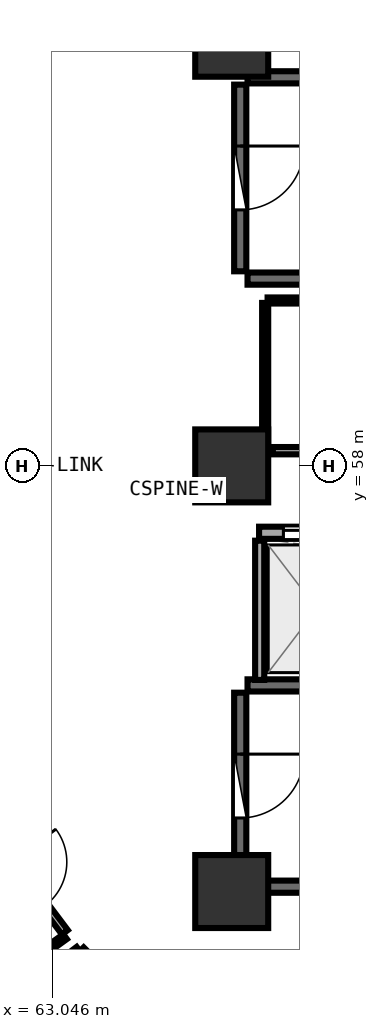
"""IFC4 building model, lengths in metres.
Left out: names, types, materials, properties, quantities, classifications, styles, units other than length and angle.
Written with IfcOpenShell. Run it as: python <this file> out.ifc"""

import sys

from ifc_helpers import new_model, si_unit, direction, frame, frame_2d, origin, origin_2d, place, context, subcontext, project, spatial, rectangle, extrude, element, fill, save


model = new_model("IFC4")
c1 = context("Model", 3, precision=1e-05, world=origin(), true_north=direction((0.0, 1.0)))
c2 = subcontext(c1, "Body", "Model", "MODEL_VIEW")
j1 = project(units=[si_unit("LENGTHUNIT", "METRE"), si_unit("PLANEANGLEUNIT", "RADIAN")], contexts=[c1])
p1 = place(None, origin())
s1 = spatial("IfcSite", under=j1, at=p1, CompositionType="ELEMENT")
p2 = place(p1, origin())
s2 = spatial("IfcBuilding", under=s1, at=p2, CompositionType="ELEMENT")
p3 = place(p2, frame((0.0, 0.0, 208.2)))
s3 = spatial("IfcBuildingStorey", under=s2, at=p3, CompositionType="ELEMENT", Elevation=208.2)
for number, where, z_axis, x_axis in (
    (1, (66.0, 51.0, 0.0), (0.0, 0.0, 1.0), (1.0, 0.0, 0.0)),
    (2, (66.0, 65.0, 0.0), (0.0, 0.0, 1.0), (1.0, 0.0, 0.0)),
    (3, (66.0, 58.0, 0.0), (0.0, 0.0, 1.0), (1.0, 0.0, 0.0)),
):
    element("IfcColumn", number, at=place(p3, frame(where, z_axis=z_axis, x_axis=x_axis)), inside=s3, PredefinedType="PILASTER", context=c2, shape_type="SweptSolid", body=[
        extrude(rectangle(XDim=1.2, YDim=1.2, at=origin_2d()), origin(), (0.0, 0.0, 1.0), 3.75),
    ])
for number, where, z_axis, x_axis in (
    (4, (66.26, 61.08, 0.0), (0.0, 0.0, 1.0), (1.0, 0.0, 0.0)),
    (5, (73.42, 64.39, 0.0), (0.0, 0.0, 1.0), (-1.0, 0.0, 0.0)),
):
    element("IfcWall", number, at=place(p3, frame(where, z_axis=z_axis, x_axis=x_axis)), inside=s3, PredefinedType="SHEAR", context=c2, shape_type="SweptSolid", body=[
        extrude(rectangle(XDim=7.16, YDim=0.2, at=frame_2d((3.58, 0.0))), origin(), (0.0, 0.0, 1.0), 3.49),
    ])
p4 = place(p3, frame((66.14, 64.27, 0.0), z_axis=(0.0, 0.0, 1.0), x_axis=(0.0, -1.0, 0.0)))
e6 = element("IfcWall", 6, at=p4, inside=s3, PredefinedType="SHEAR", context=c2, shape_type="SweptSolid", body=[
    extrude(rectangle(XDim=3.07, YDim=0.2, at=frame_2d((1.535, 0.0))), origin(), (0.0, 0.0, 1.0), 3.49),
])
p5 = place(p4, frame((1.01, 0.0, 0.0)))
e7 = element("IfcOpeningElement", 7, at=p5, cuts=e6, PredefinedType="OPENING", context=c2, shape_type="SweptSolid", body=[
    extrude(rectangle(XDim=1.05, YDim=2.1, at=frame_2d((0.525, 1.05))), frame((0.0, 0.11, 0.0), z_axis=(0.0, -1.0, 0.0), x_axis=(1.0, 0.0, 0.0)), (0.0, 0.0, 1.0), 0.22),
])
for number, where, z_axis, x_axis in (
    (8, (66.26, 51.08, 0.0), (0.0, 0.0, 1.0), (1.0, 0.0, 0.0)),
    (9, (73.42, 54.39, 0.0), (0.0, 0.0, 1.0), (-1.0, 0.0, 0.0)),
):
    element("IfcWall", number, at=place(p3, frame(where, z_axis=z_axis, x_axis=x_axis)), inside=s3, PredefinedType="SHEAR", context=c2, shape_type="SweptSolid", body=[
        extrude(rectangle(XDim=7.16, YDim=0.2, at=frame_2d((3.58, 0.0))), origin(), (0.0, 0.0, 1.0), 3.49),
    ])
p6 = place(p3, frame((66.14, 54.27, 0.0), z_axis=(0.0, 0.0, 1.0), x_axis=(0.0, -1.0, 0.0)))
e10 = element("IfcWall", 10, at=p6, inside=s3, PredefinedType="SHEAR", context=c2, shape_type="SweptSolid", body=[
    extrude(rectangle(XDim=3.07, YDim=0.2, at=frame_2d((1.535, 0.0))), origin(), (0.0, 0.0, 1.0), 3.49),
])
p7 = place(p6, frame((1.01, 0.0, 0.0)))
e11 = element("IfcOpeningElement", 11, at=p7, cuts=e10, PredefinedType="OPENING", context=c2, shape_type="SweptSolid", body=[
    extrude(rectangle(XDim=1.05, YDim=2.1, at=frame_2d((0.525, 1.05))), frame((0.0, 0.11, 0.0), z_axis=(0.0, -1.0, 0.0), x_axis=(1.0, 0.0, 0.0)), (0.0, 0.0, 1.0), 0.22),
])
p8 = place(p3, frame((66.45, 56.9, 0.0), z_axis=(0.0, 0.0, 1.0), x_axis=(1.0, 0.0, 0.0)))
e12 = element("IfcWall", 12, at=p8, inside=s3, PredefinedType="SOLIDWALL", context=c2, shape_type="SweptSolid", body=[
    extrude(rectangle(XDim=14.4, YDim=0.2, at=frame_2d((7.2, 0.0))), origin(), (0.0, 0.0, 1.0), 3.48),
])
p9 = place(p8, frame((0.4, 0.0, 0.0)))
e13 = element("IfcOpeningElement", 13, at=p9, cuts=e12, PredefinedType="OPENING", context=c2, shape_type="SweptSolid", body=[
    extrude(rectangle(XDim=1.1, YDim=2.1, at=frame_2d((0.55, 1.05))), frame((0.0, 0.11, 0.0), z_axis=(0.0, -1.0, 0.0), x_axis=(1.0, 0.0, 0.0)), (0.0, 0.0, 1.0), 0.22),
])
p10 = place(p8, frame((2.4, 0.0, 0.0)))
e14 = element("IfcOpeningElement", 14, at=p10, cuts=e12, PredefinedType="OPENING", context=c2, shape_type="SweptSolid", body=[
    extrude(rectangle(XDim=1.1, YDim=2.1, at=frame_2d((0.55, 1.05))), frame((0.0, 0.11, 0.0), z_axis=(0.0, -1.0, 0.0), x_axis=(1.0, 0.0, 0.0)), (0.0, 0.0, 1.0), 0.22),
])
p11 = place(p8, frame((4.4, 0.0, 0.0)))
e15 = element("IfcOpeningElement", 15, at=p11, cuts=e12, PredefinedType="OPENING", context=c2, shape_type="SweptSolid", body=[
    extrude(rectangle(XDim=1.1, YDim=2.1, at=frame_2d((0.55, 1.05))), frame((0.0, 0.11, 0.0), z_axis=(0.0, -1.0, 0.0), x_axis=(1.0, 0.0, 0.0)), (0.0, 0.0, 1.0), 0.22),
])
p12 = place(p3, frame((66.46, 54.48, 0.0), z_axis=(0.0, 0.0, 1.0), x_axis=(0.0, 1.0, 0.0)))
e16 = element("IfcWall", 16, at=p12, inside=s3, PredefinedType="PARTITIONING", context=c2, shape_type="SweptSolid", body=[
    extrude(rectangle(XDim=2.29, YDim=0.15, at=frame_2d((1.145, 0.0))), origin(), (0.0, 0.0, 1.0), 3.48),
])
p13 = place(p3, frame((66.675, 58.25, 0.0), z_axis=(0.0, 0.0, 1.0), x_axis=(1.0, 0.0, 0.0)))
e17 = element("IfcWall", 17, at=p13, inside=s3, PredefinedType="PARTITIONING", context=c2, shape_type="SweptSolid", body=[
    extrude(rectangle(XDim=5.715, YDim=0.12, at=frame_2d((2.857, 0.0))), origin(), (0.0, 0.0, 1.0), 3.48),
])
p14 = place(p13, frame((2.407, 0.0, 0.0)))
e18 = element("IfcOpeningElement", 18, at=p14, cuts=e17, PredefinedType="OPENING", context=c2, shape_type="SweptSolid", body=[
    extrude(rectangle(XDim=0.9, YDim=2.08, at=frame_2d((0.45, 1.04))), frame((0.0, 0.07, 0.0), z_axis=(0.0, -1.0, 0.0), x_axis=(1.0, 0.0, 0.0)), (0.0, 0.0, 1.0), 0.14),
])
p15 = place(p3, frame((62.06, 51.922, 0.0), z_axis=(0.0, 0.0, 1.0), x_axis=(0.600647163637, -0.799514218019, 0.0)))
e19 = element("IfcWall", 19, at=p15, inside=s3, PredefinedType="PARTITIONING", context=c2, shape_type="SweptSolid", body=[
    extrude(rectangle(XDim=1.991, YDim=0.12, at=frame_2d((0.996, 0.0))), origin(), (0.0, 0.0, 1.0), 3.025),
])
p16 = place(p15, frame((0.546, 0.0, 0.0)))
e20 = element("IfcOpeningElement", 20, at=p16, cuts=e19, PredefinedType="OPENING", context=c2, shape_type="SweptSolid", body=[
    extrude(rectangle(XDim=0.9, YDim=2.08, at=frame_2d((0.45, 1.04))), frame((0.0, 0.07, 0.0), z_axis=(0.0, -1.0, 0.0), x_axis=(1.0, 0.0, 0.0)), (0.0, 0.0, 1.0), 0.14),
])
p17 = place(p3, frame((72.41, 60.72, 0.0), z_axis=(0.0, 0.0, 1.0), x_axis=(-1.0, 0.0, 0.0)))
e21 = element("IfcWall", 21, at=p17, inside=s3, PredefinedType="PARTITIONING", context=c2, shape_type="SweptSolid", body=[
    extrude(rectangle(XDim=5.82, YDim=0.1, at=frame_2d((2.91, 0.0))), origin(), (0.0, 0.0, 1.0), 3.48),
])
p18 = place(p3, frame((66.55, 60.68, 0.0), z_axis=(0.0, 0.0, 1.0), x_axis=(0.0, -1.0, 0.0)))
e22 = element("IfcWall", 22, at=p18, inside=s3, PredefinedType="PARTITIONING", context=c2, shape_type="SweptSolid", body=[
    extrude(rectangle(XDim=2.383, YDim=0.1, at=frame_2d((1.191, 0.0))), origin(), (0.0, 0.0, 1.0), 3.48),
])
p19 = place(p3, frame((63.26, 50.259, 0.0), z_axis=(0.0, 0.0, 1.0), x_axis=(-0.810850730514, -0.585253016076, 0.0)))
e23 = element("IfcWall", 23, at=p19, inside=s3, PredefinedType="PARTITIONING", context=c2, shape_type="SweptSolid", body=[
    extrude(rectangle(XDim=6.793, YDim=0.1, at=frame_2d((3.396, 0.0))), origin(), (0.0, 0.0, 1.0), 3.175),
])
p20 = place(p3, frame((63.519, 50.036, 0.0), z_axis=(0.0, 0.0, 1.0), x_axis=(0.708179895313, -0.706032036012, 0.0)))
e24 = element("IfcWall", 24, at=p20, inside=s3, PredefinedType="PLUMBINGWALL", context=c2, shape_type="SweptSolid", body=[
    extrude(rectangle(XDim=0.796, YDim=0.13, at=frame_2d((0.398, 0.0))), origin(), (0.0, 0.0, 1.0), 3.025),
])
p21 = place(p3, frame((60.575, 47.828, 0.0), z_axis=(0.0, 0.0, 1.0), x_axis=(0.79681650582, 0.604221363453, 0.0)))
e25 = element("IfcWall", 25, at=p21, inside=s3, PredefinedType="PLUMBINGWALL", context=c2, shape_type="SweptSolid", body=[
    extrude(rectangle(XDim=3.657, YDim=0.13, at=frame_2d((1.829, 0.0))), origin(), (0.0, 0.0, 1.0), 3.175),
])
p22 = place(p5, origin())
e26 = element("IfcDoor", 26, at=p22, inside=s3, OperationType="SINGLE_SWING_LEFT", PredefinedType="DOOR", context=c2, shape_type="SweptSolid", body=[
    extrude(rectangle(XDim=1.05, YDim=2.1, at=frame_2d((0.525, 1.05))), frame((0.0, 0.025, 0.0), z_axis=(0.0, -1.0, 0.0), x_axis=(1.0, 0.0, 0.0)), (0.0, 0.0, 1.0), 0.05),
])
fill(e7, e26)
p23 = place(p7, origin())
e27 = element("IfcDoor", 27, at=p23, inside=s3, OperationType="SINGLE_SWING_LEFT", PredefinedType="DOOR", context=c2, shape_type="SweptSolid", body=[
    extrude(rectangle(XDim=1.05, YDim=2.1, at=frame_2d((0.525, 1.05))), frame((0.0, 0.025, 0.0), z_axis=(0.0, -1.0, 0.0), x_axis=(1.0, 0.0, 0.0)), (0.0, 0.0, 1.0), 0.05),
])
fill(e11, e27)
p24 = place(p9, origin())
e28 = element("IfcDoor", 28, at=p24, inside=s3, OperationType="DOUBLE_DOOR_SLIDING", PredefinedType="DOOR", context=c2, shape_type="SweptSolid", body=[
    extrude(rectangle(XDim=1.1, YDim=2.1, at=frame_2d((0.55, 1.05))), frame((0.0, 0.025, 0.0), z_axis=(0.0, -1.0, 0.0), x_axis=(1.0, 0.0, 0.0)), (0.0, 0.0, 1.0), 0.05),
])
fill(e13, e28)
save(model, sys.argv[1])
